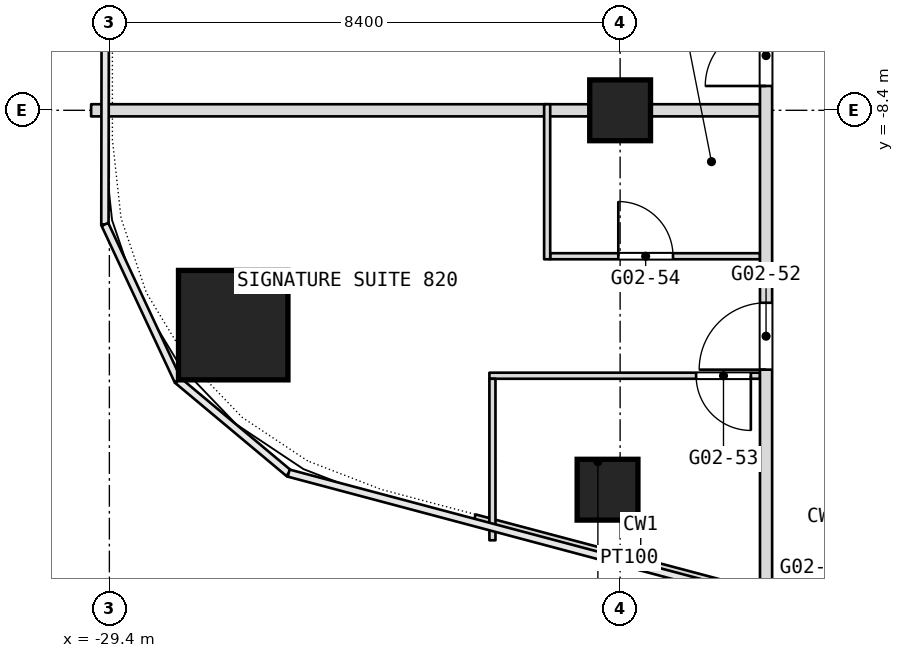
"""IFC4 building model, lengths in metres.
Left out: names, types, materials, properties, quantities, classifications, styles, units other than length and angle.
Written with IfcOpenShell. Run it as: python <this file> out.ifc"""

import sys

from ifc_helpers import new_model, si_unit, direction, frame, frame_2d, origin, origin_2d, place, context, subcontext, project, spatial, rectangle, extrude, element, fill, save


model = new_model("IFC4")
c1 = context("Model", 3, precision=1e-05, world=origin(), true_north=direction((0.0, 1.0)))
c2 = subcontext(c1, "Body", "Model", "MODEL_VIEW")
j1 = project(units=[si_unit("LENGTHUNIT", "METRE"), si_unit("PLANEANGLEUNIT", "RADIAN")], contexts=[c1])
p1 = place(None, origin())
s1 = spatial("IfcSite", under=j1, at=p1, CompositionType="ELEMENT")
p2 = place(p1, origin())
s2 = spatial("IfcBuilding", under=s1, at=p2, CompositionType="ELEMENT")
p3 = place(p2, frame((0.0, 0.0, 43.7)))
s3 = spatial("IfcBuildingStorey", under=s2, at=p3, CompositionType="ELEMENT", Elevation=43.7)
p4 = place(p3, frame((-27.363, -11.933, 0.0), z_axis=(0.0, 0.0, 1.0), x_axis=(1.0, 0.0, 0.0)))
e1 = element("IfcColumn", 1, at=p4, inside=s3, PredefinedType="COLUMN", context=c2, shape_type="SweptSolid", body=[
    extrude(rectangle(XDim=1.8, YDim=1.8, at=origin_2d()), origin(), (0.0, 0.0, 1.0), 3.6),
])
for number, where, z_axis, x_axis in (
    (2, (-21.0, -8.4, 0.0), (0.0, 0.0, 1.0), (1.0, 0.0, 0.0)),
    (3, (-21.207, -14.639, 0.0), (0.0, 0.0, 1.0), (1.0, 0.0, 0.0)),
):
    element("IfcColumn", number, at=place(p3, frame(where, z_axis=z_axis, x_axis=x_axis)), inside=s3, PredefinedType="COLUMN", context=c2, shape_type="SweptSolid", body=[
        extrude(rectangle(XDim=1.0, YDim=1.0, at=origin_2d()), origin(), (0.0, 0.0, 1.0), 3.6),
    ])
p5 = place(p3, frame((-23.39, -15.094, 0.0), z_axis=(0.0, 0.0, 1.0), x_axis=(0.966552628131, -0.256468354876, 0.0)))
e4 = element("IfcWall", 4, at=p5, inside=s3, PredefinedType="PARTITIONING", context=c2, shape_type="SweptSolid", body=[
    extrude(rectangle(XDim=5.256, YDim=0.1, at=frame_2d((2.628, 0.0))), origin(), (0.0, 0.0, 1.0), 3.34),
])
p6 = place(p3, frame((-23.15, -12.765, 0.0), z_axis=(0.0, 0.0, 1.0), x_axis=(1.0, 0.0, 0.0)))
e5 = element("IfcWall", 5, at=p6, inside=s3, PredefinedType="PARTITIONING", context=c2, shape_type="SweptSolid", body=[
    extrude(rectangle(XDim=4.45, YDim=0.1, at=frame_2d((2.225, 0.0))), origin(), (0.0, 0.0, 1.0), 3.34),
])
p7 = place(p6, frame((3.4, 0.0, 0.0)))
e6 = element("IfcOpeningElement", 6, at=p7, cuts=e5, PredefinedType="OPENING", context=c2, shape_type="SweptSolid", body=[
    extrude(rectangle(XDim=0.9, YDim=2.1, at=frame_2d((0.45, 1.05))), frame((0.0, 0.05, 0.0), z_axis=(0.0, -1.0, 0.0), x_axis=(1.0, 0.0, 0.0)), (0.0, 0.0, 1.0), 0.1),
])
p8 = place(p3, frame((-22.15, -10.8, 0.0), z_axis=(0.0, 0.0, 1.0), x_axis=(1.0, 0.0, 0.0)))
e7 = element("IfcWall", 7, at=p8, inside=s3, PredefinedType="PARTITIONING", context=c2, shape_type="SweptSolid", body=[
    extrude(rectangle(XDim=3.45, YDim=0.1, at=frame_2d((1.725, 0.0))), origin(), (0.0, 0.0, 1.0), 3.34),
])
p9 = place(p8, frame((1.12, 0.0, 0.0)))
e8 = element("IfcOpeningElement", 8, at=p9, cuts=e7, PredefinedType="OPENING", context=c2, shape_type="SweptSolid", body=[
    extrude(rectangle(XDim=0.9, YDim=2.1, at=frame_2d((0.45, 1.05))), frame((0.0, 0.05, 0.0), z_axis=(0.0, -1.0, 0.0), x_axis=(1.0, 0.0, 0.0)), (0.0, 0.0, 1.0), 0.1),
])
p10 = place(p3, frame((-29.7, -8.4, 0.0), z_axis=(0.0, 0.0, 1.0), x_axis=(1.0, 0.0, 0.0)))
e9 = element("IfcWall", 9, at=p10, inside=s3, PredefinedType="PARTITIONING", context=c2, shape_type="SweptSolid", body=[
    extrude(rectangle(XDim=11.0, YDim=0.2, at=frame_2d((5.5, 0.0))), origin(), (0.0, 0.0, 1.0), 2.84),
])
p11 = place(p3, frame((-18.6, -16.665, 0.0), z_axis=(0.0, 0.0, 1.0), x_axis=(0.0, 1.0, 0.0)))
e10 = element("IfcWall", 10, at=p11, inside=s3, PredefinedType="PARTITIONING", context=c2, shape_type="SweptSolid", body=[
    extrude(rectangle(XDim=23.565, YDim=0.2, at=frame_2d((11.782, 0.0))), origin(), (0.0, 0.0, 1.0), 3.34),
])
p12 = place(p11, frame((4.0, 0.0, 0.0)))
e11 = element("IfcOpeningElement", 11, at=p12, cuts=e10, PredefinedType="OPENING", context=c2, shape_type="SweptSolid", body=[
    extrude(rectangle(XDim=1.1, YDim=2.1, at=frame_2d((0.55, 1.05))), frame((0.0, 0.1, 0.0), z_axis=(0.0, -1.0, 0.0), x_axis=(1.0, 0.0, 0.0)), (0.0, 0.0, 1.0), 0.2),
])
p13 = place(p11, frame((8.665, 0.0, 0.0)))
e12 = element("IfcOpeningElement", 12, at=p13, cuts=e10, PredefinedType="OPENING", context=c2, shape_type="SweptSolid", body=[
    extrude(rectangle(XDim=1.0, YDim=2.1, at=frame_2d((0.5, 1.05))), frame((0.0, 0.1, 0.0), z_axis=(0.0, -1.0, 0.0), x_axis=(1.0, 0.0, 0.0)), (0.0, 0.0, 1.0), 0.2),
])
p14 = place(p11, frame((15.265, 0.0, 0.0)))
e13 = element("IfcOpeningElement", 13, at=p14, cuts=e10, PredefinedType="OPENING", context=c2, shape_type="SweptSolid", body=[
    extrude(rectangle(XDim=1.0, YDim=2.1, at=frame_2d((0.5, 1.05))), frame((0.0, 0.1, 0.0), z_axis=(0.0, -1.0, 0.0), x_axis=(1.0, 0.0, 0.0)), (0.0, 0.0, 1.0), 0.2),
])
p15 = place(p11, frame((19.465, 0.0, 0.0)))
e14 = element("IfcOpeningElement", 14, at=p15, cuts=e10, PredefinedType="OPENING", context=c2, shape_type="SweptSolid", body=[
    extrude(rectangle(XDim=1.0, YDim=2.1, at=frame_2d((0.5, 1.05))), frame((0.0, 0.1, 0.0), z_axis=(0.0, -1.0, 0.0), x_axis=(1.0, 0.0, 0.0)), (0.0, 0.0, 1.0), 0.2),
])
p16 = place(p3, frame((-22.2, -10.85, 0.0), z_axis=(0.0, 0.0, 1.0), x_axis=(0.0, 1.0, 0.0)))
e15 = element("IfcWall", 15, at=p16, inside=s3, PredefinedType="PARTITIONING", context=c2, shape_type="SweptSolid", body=[
    extrude(rectangle(XDim=2.55, YDim=0.1, at=frame_2d((1.275, 0.0))), origin(), (0.0, 0.0, 1.0), 3.34),
])
p17 = place(p3, frame((-23.1, -15.471, 0.0), z_axis=(0.0, 0.0, 1.0), x_axis=(0.0, 1.0, 0.0)))
e16 = element("IfcWall", 16, at=p17, inside=s3, PredefinedType="PARTITIONING", context=c2, shape_type="SweptSolid", body=[
    extrude(rectangle(XDim=2.656, YDim=0.1, at=frame_2d((1.328, 0.0))), origin(), (0.0, 0.0, 1.0), 3.34),
])
p18 = place(p7, origin())
e17 = element("IfcDoor", 17, at=p18, inside=s3, OperationType="SINGLE_SWING_LEFT", PredefinedType="DOOR", context=c2, shape_type="SweptSolid", body=[
    extrude(rectangle(XDim=0.9, YDim=2.1, at=frame_2d((0.45, 1.05))), frame((0.0, 0.025, 0.0), z_axis=(0.0, -1.0, 0.0), x_axis=(1.0, 0.0, 0.0)), (0.0, 0.0, 1.0), 0.05),
])
fill(e6, e17)
p19 = place(p9, origin())
e18 = element("IfcDoor", 18, at=p19, inside=s3, OperationType="SINGLE_SWING_LEFT", PredefinedType="DOOR", context=c2, shape_type="SweptSolid", body=[
    extrude(rectangle(XDim=0.9, YDim=2.1, at=frame_2d((0.45, 1.05))), frame((0.0, 0.025, 0.0), z_axis=(0.0, -1.0, 0.0), x_axis=(1.0, 0.0, 0.0)), (0.0, 0.0, 1.0), 0.05),
])
fill(e8, e18)
p20 = place(p12, origin())
e19 = element("IfcDoor", 19, at=p20, inside=s3, OperationType="SINGLE_SWING_LEFT", PredefinedType="DOOR", context=c2, shape_type="SweptSolid", body=[
    extrude(rectangle(XDim=1.1, YDim=2.1, at=frame_2d((0.55, 1.05))), frame((0.0, 0.025, 0.0), z_axis=(0.0, -1.0, 0.0), x_axis=(1.0, 0.0, 0.0)), (0.0, 0.0, 1.0), 0.05),
])
fill(e11, e19)
p21 = place(p13, origin())
e20 = element("IfcDoor", 20, at=p21, inside=s3, OperationType="SINGLE_SWING_RIGHT", PredefinedType="DOOR", context=c2, shape_type="SweptSolid", body=[
    extrude(rectangle(XDim=1.0, YDim=2.1, at=frame_2d((0.5, 1.05))), frame((0.0, 0.025, 0.0), z_axis=(0.0, -1.0, 0.0), x_axis=(1.0, 0.0, 0.0)), (0.0, 0.0, 1.0), 0.05),
])
fill(e12, e20)
save(model, sys.argv[1])
